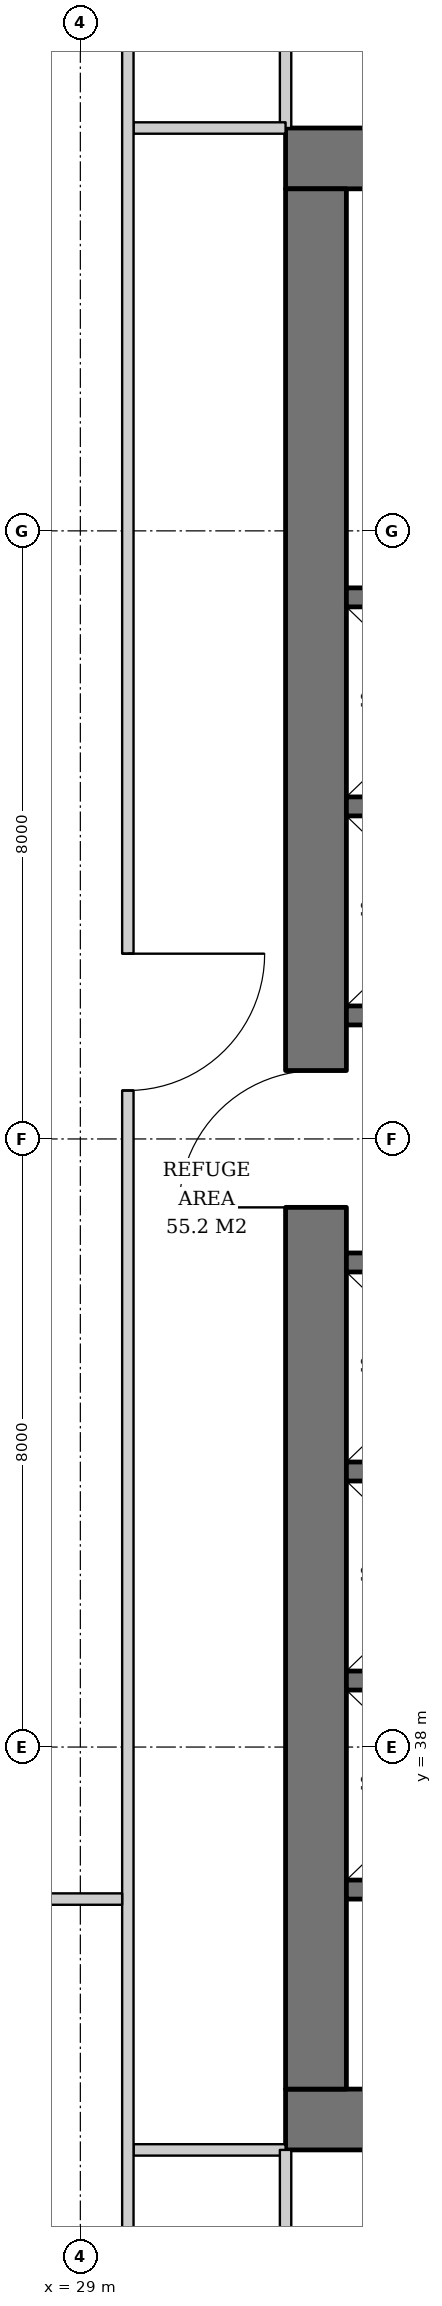
"""IFC4 building model, lengths in metres.
Left out: names, types, materials, properties, quantities, classifications, styles, units other than length and angle.
Written with IfcOpenShell. Run it as: python <this file> out.ifc"""

import sys

from ifc_helpers import new_model, si_unit, direction, frame, frame_2d, origin, place, context, subcontext, project, spatial, rectangle, extrude, element, fill, save


model = new_model("IFC4")
c1 = context("Model", 3, precision=1e-05, world=origin(), true_north=direction((0.0, 1.0)))
c2 = subcontext(c1, "Body", "Model", "MODEL_VIEW")
j1 = project(units=[si_unit("LENGTHUNIT", "METRE"), si_unit("PLANEANGLEUNIT", "RADIAN")], contexts=[c1])
p1 = place(None, origin())
s1 = spatial("IfcSite", under=j1, at=p1, CompositionType="ELEMENT")
p2 = place(p1, origin())
s2 = spatial("IfcBuilding", under=s1, at=p2, CompositionType="ELEMENT")
p3 = place(p2, frame((0.0, 0.0, 85.6)))
s3 = spatial("IfcBuildingStorey", under=s2, at=p3, CompositionType="ELEMENT", Elevation=85.6)
p4 = place(p3, frame((31.7, 33.1, 0.0), z_axis=(0.0, 0.0, 1.0), x_axis=(1.0, 0.0, 0.0)))
e1 = element("IfcWall", 1, at=p4, inside=s3, PredefinedType="SHEAR", context=c2, shape_type="SweptSolid", body=[
    extrude(rectangle(XDim=26.6, YDim=0.8, at=frame_2d((13.3, 0.0))), origin(), (0.0, 0.0, 1.0), 3.8),
])
p5 = place(p4, frame((7.3, 0.0, 0.0)))
e2 = element("IfcOpeningElement", 2, at=p5, cuts=e1, PredefinedType="OPENING", context=c2, shape_type="SweptSolid", body=[
    extrude(rectangle(XDim=1.0, YDim=2.1, at=frame_2d((0.5, 1.05))), frame((0.0, 0.41, 0.0), z_axis=(0.0, -1.0, 0.0), x_axis=(1.0, 0.0, 0.0)), (0.0, 0.0, 1.0), 0.82),
])
p6 = place(p4, frame((18.75, 0.0, 0.0)))
e3 = element("IfcOpeningElement", 3, at=p6, cuts=e1, PredefinedType="OPENING", context=c2, shape_type="SweptSolid", body=[
    extrude(rectangle(XDim=1.0, YDim=2.1, at=frame_2d((0.5, 1.05))), frame((0.0, 0.41, 0.0), z_axis=(0.0, -1.0, 0.0), x_axis=(1.0, 0.0, 0.0)), (0.0, 0.0, 1.0), 0.82),
])
p7 = place(p4, frame((1.9, 0.0, 0.0)))
e4 = element("IfcOpeningElement", 4, at=p7, cuts=e1, PredefinedType="OPENING", context=c2, shape_type="SweptSolid", body=[
    extrude(rectangle(XDim=1.0, YDim=2.1, at=frame_2d((0.5, 1.05))), frame((0.0, 0.41, 0.0), z_axis=(0.0, -1.0, 0.0), x_axis=(1.0, 0.0, 0.0)), (0.0, 0.0, 1.0), 0.82),
])
p8 = place(p4, frame((4.725, 0.0, 0.0)))
e5 = element("IfcOpeningElement", 5, at=p8, cuts=e1, PredefinedType="OPENING", context=c2, shape_type="SweptSolid", body=[
    extrude(rectangle(XDim=1.0, YDim=2.1, at=frame_2d((0.5, 1.05))), frame((0.0, 0.41, 0.0), z_axis=(0.0, -1.0, 0.0), x_axis=(1.0, 0.0, 0.0)), (0.0, 0.0, 1.0), 0.82),
])
p9 = place(p3, frame((31.7, 58.9, 0.0), z_axis=(0.0, 0.0, 1.0), x_axis=(1.0, 0.0, 0.0)))
e6 = element("IfcWall", 6, at=p9, inside=s3, PredefinedType="SHEAR", context=c2, shape_type="SweptSolid", body=[
    extrude(rectangle(XDim=26.6, YDim=0.8, at=frame_2d((13.3, 0.0))), origin(), (0.0, 0.0, 1.0), 3.8),
])
p10 = place(p9, frame((17.94, 0.0, 0.0)))
e7 = element("IfcOpeningElement", 7, at=p10, cuts=e6, PredefinedType="OPENING", context=c2, shape_type="SweptSolid", body=[
    extrude(rectangle(XDim=1.0, YDim=2.1, at=frame_2d((0.5, 1.05))), frame((0.0, 0.41, 0.0), z_axis=(0.0, -1.0, 0.0), x_axis=(1.0, 0.0, 0.0)), (0.0, 0.0, 1.0), 0.82),
])
p11 = place(p9, frame((5.825, 0.0, 0.0)))
e8 = element("IfcOpeningElement", 8, at=p11, cuts=e6, PredefinedType="OPENING", context=c2, shape_type="SweptSolid", body=[
    extrude(rectangle(XDim=1.0, YDim=2.1, at=frame_2d((0.5, 1.05))), frame((0.0, 0.41, 0.0), z_axis=(0.0, -1.0, 0.0), x_axis=(1.0, 0.0, 0.0)), (0.0, 0.0, 1.0), 0.82),
])
p12 = place(p9, frame((2.637, 0.0, 0.0)))
e9 = element("IfcOpeningElement", 9, at=p12, cuts=e6, PredefinedType="OPENING", context=c2, shape_type="SweptSolid", body=[
    extrude(rectangle(XDim=1.0, YDim=2.1, at=frame_2d((0.5, 1.05))), frame((0.0, 0.41, 0.0), z_axis=(0.0, -1.0, 0.0), x_axis=(1.0, 0.0, 0.0)), (0.0, 0.0, 1.0), 0.82),
])
p13 = place(p3, frame((32.1, 33.5, 0.0), z_axis=(0.0, 0.0, 1.0), x_axis=(0.0, 1.0, 0.0)))
e10 = element("IfcWall", 10, at=p13, inside=s3, PredefinedType="SHEAR", context=c2, shape_type="SweptSolid", body=[
    extrude(rectangle(XDim=25.0, YDim=0.8, at=frame_2d((12.5, 0.0))), origin(), (0.0, 0.0, 1.0), 3.8),
])
p14 = place(p13, frame((11.6, 0.0, 0.0)))
e11 = element("IfcOpeningElement", 11, at=p14, cuts=e10, PredefinedType="OPENING", context=c2, shape_type="SweptSolid", body=[
    extrude(rectangle(XDim=1.8, YDim=2.4, at=frame_2d((0.9, 1.2))), frame((0.0, 0.41, 0.0), z_axis=(0.0, -1.0, 0.0), x_axis=(1.0, 0.0, 0.0)), (0.0, 0.0, 1.0), 0.82),
])
for number, where, z_axis, x_axis in (
    (12, (32.5, 36.125, 0.0), (0.0, 0.0, 1.0), (1.0, 0.0, 0.0)),
    (13, (32.5, 38.875, 0.0), (0.0, 0.0, 1.0), (1.0, 0.0, 0.0)),
    (14, (32.5, 41.625, 0.0), (0.0, 0.0, 1.0), (1.0, 0.0, 0.0)),
    (15, (32.5, 44.375, 0.0), (0.0, 0.0, 1.0), (1.0, 0.0, 0.0)),
    (16, (32.5, 47.625, 0.0), (0.0, 0.0, 1.0), (1.0, 0.0, 0.0)),
    (17, (32.5, 50.375, 0.0), (0.0, 0.0, 1.0), (1.0, 0.0, 0.0)),
    (18, (32.5, 53.125, 0.0), (0.0, 0.0, 1.0), (1.0, 0.0, 0.0)),
):
    element("IfcWall", number, at=place(p3, frame(where, z_axis=z_axis, x_axis=x_axis)), inside=s3, PredefinedType="SHEAR", context=c2, shape_type="SweptSolid", body=[
        extrude(rectangle(XDim=2.6, YDim=0.25, at=frame_2d((1.3, 0.0))), origin(), (0.0, 0.0, 1.0), 3.8),
    ])
for number, where, z_axis, x_axis in (
    (19, (31.7, 59.3, 0.0), (0.0, 0.0, 1.0), (0.0, 1.0, 0.0)),
    (20, (31.7, 32.7, 0.0), (0.0, 0.0, 1.0), (-1.0, 0.0, 0.0)),
):
    element("IfcWall", number, at=place(p3, frame(where, z_axis=z_axis, x_axis=x_axis)), inside=s3, PredefinedType="PARTITIONING", context=c2, shape_type="SweptSolid", body=[
        extrude(rectangle(XDim=2.0, YDim=0.15, at=frame_2d((1.0, 0.0))), origin(), (0.0, 0.0, 1.0), 3.6),
    ])
p15 = place(p3, frame((31.7, 59.3, 0.0), z_axis=(0.0, 0.0, 1.0), x_axis=(-1.0, 0.0, 0.0)))
e21 = element("IfcWall", 21, at=p15, inside=s3, PredefinedType="PARTITIONING", context=c2, shape_type="SweptSolid", body=[
    extrude(rectangle(XDim=2.0, YDim=0.15, at=frame_2d((1.0, 0.0))), origin(), (0.0, 0.0, 1.0), 2.592),
])
p16 = place(p3, frame((29.625, 61.45, 0.0), z_axis=(0.0, 0.0, 1.0), x_axis=(0.0, -1.0, 0.0)))
e22 = element("IfcWall", 22, at=p16, inside=s3, PredefinedType="PARTITIONING", context=c2, shape_type="SweptSolid", body=[
    extrude(rectangle(XDim=30.75, YDim=0.15, at=frame_2d((15.375, 0.0))), origin(), (0.0, 0.0, 1.0), 2.592),
])
p17 = place(p16, frame((13.012, 0.0, 0.0)))
e23 = element("IfcOpeningElement", 23, at=p17, cuts=e22, PredefinedType="OPENING", context=c2, shape_type="SweptSolid", body=[
    extrude(rectangle(XDim=1.8, YDim=2.4, at=frame_2d((0.9, 1.2))), frame((0.0, 0.085, 0.0), z_axis=(0.0, -1.0, 0.0), x_axis=(1.0, 0.0, 0.0)), (0.0, 0.0, 1.0), 0.17),
])
p18 = place(p3, frame((29.55, 36.0, 0.0), z_axis=(0.0, 0.0, 1.0), x_axis=(-1.0, 0.0, 0.0)))
e24 = element("IfcWall", 24, at=p18, inside=s3, PredefinedType="PARTITIONING", context=c2, shape_type="SweptSolid", body=[
    extrude(rectangle(XDim=5.798, YDim=0.15, at=frame_2d((2.899, 0.0))), origin(), (0.0, 0.0, 1.0), 3.6),
])
p19 = place(p3, frame((31.7, 32.7, 0.0), z_axis=(0.0, 0.0, 1.0), x_axis=(0.0, -1.0, 0.0)))
e25 = element("IfcWall", 25, at=p19, inside=s3, PredefinedType="PARTITIONING", context=c2, shape_type="SweptSolid", body=[
    extrude(rectangle(XDim=2.0, YDim=0.15, at=frame_2d((1.0, 0.0))), origin(), (0.0, 0.0, 1.0), 2.592),
])
p20 = place(p14, origin())
e26 = element("IfcDoor", 26, at=p20, inside=s3, OperationType="DOUBLE_DOOR_SINGLE_SWING", PredefinedType="DOOR", context=c2, shape_type="SweptSolid", body=[
    extrude(rectangle(XDim=1.8, YDim=2.4, at=frame_2d((0.9, 1.2))), frame((0.0, 0.025, 0.0), z_axis=(0.0, -1.0, 0.0), x_axis=(1.0, 0.0, 0.0)), (0.0, 0.0, 1.0), 0.05),
])
fill(e11, e26)
p21 = place(p17, origin())
e27 = element("IfcDoor", 27, at=p21, inside=s3, OperationType="DOUBLE_DOOR_SINGLE_SWING", PredefinedType="DOOR", context=c2, shape_type="SweptSolid", body=[
    extrude(rectangle(XDim=1.8, YDim=2.4, at=frame_2d((0.9, 1.2))), frame((0.0, 0.025, 0.0), z_axis=(0.0, -1.0, 0.0), x_axis=(1.0, 0.0, 0.0)), (0.0, 0.0, 1.0), 0.05),
])
fill(e23, e27)
save(model, sys.argv[1])
